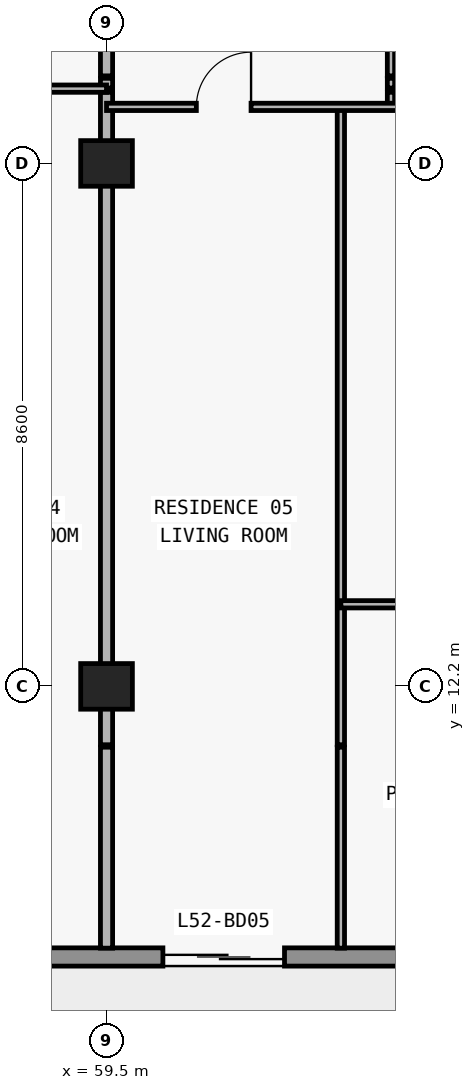
"""IFC4 building model, lengths in metres.
Left out: names, types, materials, properties, quantities, classifications, styles, units other than length and angle.
Written with IfcOpenShell. Run it as: python <this file> out.ifc"""

import sys

from ifc_helpers import new_model, si_unit, direction, frame, frame_2d, origin, origin_2d, place, context, subcontext, project, spatial, rectangle, extrude, element, fill, save


model = new_model("IFC4")
c1 = context("Model", 3, precision=1e-05, world=origin(), true_north=direction((0.0, 1.0)))
c2 = subcontext(c1, "Body", "Model", "MODEL_VIEW")
j1 = project(units=[si_unit("LENGTHUNIT", "METRE"), si_unit("PLANEANGLEUNIT", "RADIAN")], contexts=[c1])
p1 = place(None, origin())
s1 = spatial("IfcSite", under=j1, at=p1, CompositionType="ELEMENT")
p2 = place(p1, origin())
s2 = spatial("IfcBuilding", under=s1, at=p2, CompositionType="ELEMENT")
p3 = place(p2, frame((0.0, 0.0, 188.4)))
s3 = spatial("IfcBuildingStorey", under=s2, at=p3, CompositionType="ELEMENT", Elevation=188.4)
for number, where, z_axis, x_axis in (
    (1, (59.5, 12.2, 0.0), (0.0, 0.0, 1.0), (1.0, 0.0, 0.0)),
    (2, (59.5, 20.8, 0.0), (0.0, 0.0, 1.0), (1.0, 0.0, 0.0)),
):
    element("IfcColumn", number, at=place(p3, frame(where, z_axis=z_axis, x_axis=x_axis)), inside=s3, PredefinedType="COLUMN", context=c2, shape_type="SweptSolid", body=[
        extrude(rectangle(XDim=0.85, YDim=0.75, at=origin_2d()), origin(), (0.0, 0.0, 1.0), 3.05),
    ])
p4 = place(p3, frame((67.7, 7.75, 0.0), z_axis=(0.0, 0.0, 1.0), x_axis=(-1.0, 0.0, 0.0)))
e3 = element("IfcWall", 3, at=p4, inside=s3, PredefinedType="STANDARD", context=c2, shape_type="SweptSolid", body=[
    extrude(rectangle(XDim=57.6, YDim=0.3, at=frame_2d((28.8, 0.0))), origin(), (0.0, 0.0, 1.0), 3.05),
])
p5 = place(p4, frame((54.69, 0.0, 0.0)))
e4 = element("IfcOpeningElement", 4, at=p5, cuts=e3, PredefinedType="OPENING", context=c2, shape_type="SweptSolid", body=[
    extrude(rectangle(XDim=2.0, YDim=2.3, at=frame_2d((1.0, 1.15))), frame((0.0, 0.16, 0.0), z_axis=(0.0, -1.0, 0.0), x_axis=(1.0, 0.0, 0.0)), (0.0, 0.0, 1.0), 0.32),
])
p6 = place(p4, frame((50.21, 0.0, 0.65)))
e5 = element("IfcOpeningElement", 5, at=p6, cuts=e3, PredefinedType="OPENING", context=c2, shape_type="SweptSolid", body=[
    extrude(rectangle(XDim=2.6, YDim=1.85, at=frame_2d((1.3, 0.925))), frame((0.0, 0.16, 0.0), z_axis=(0.0, -1.0, 0.0), x_axis=(1.0, 0.0, 0.0)), (0.0, 0.0, 1.0), 0.32),
])
p7 = place(p4, frame((44.1, 0.0, 0.85)))
e6 = element("IfcOpeningElement", 6, at=p7, cuts=e3, PredefinedType="OPENING", context=c2, shape_type="SweptSolid", body=[
    extrude(rectangle(XDim=2.2, YDim=1.55, at=frame_2d((1.1, 0.775))), frame((0.0, 0.16, 0.0), z_axis=(0.0, -1.0, 0.0), x_axis=(1.0, 0.0, 0.0)), (0.0, 0.0, 1.0), 0.32),
])
p8 = place(p4, frame((37.69, 0.0, 0.0)))
e7 = element("IfcOpeningElement", 7, at=p8, cuts=e3, PredefinedType="OPENING", context=c2, shape_type="SweptSolid", body=[
    extrude(rectangle(XDim=2.0, YDim=2.3, at=frame_2d((1.0, 1.15))), frame((0.0, 0.16, 0.0), z_axis=(0.0, -1.0, 0.0), x_axis=(1.0, 0.0, 0.0)), (0.0, 0.0, 1.0), 0.32),
])
p9 = place(p4, frame((33.59, 0.0, 0.85)))
e8 = element("IfcOpeningElement", 8, at=p9, cuts=e3, PredefinedType="OPENING", context=c2, shape_type="SweptSolid", body=[
    extrude(rectangle(XDim=1.8, YDim=1.55, at=frame_2d((0.9, 0.775))), frame((0.0, 0.16, 0.0), z_axis=(0.0, -1.0, 0.0), x_axis=(1.0, 0.0, 0.0)), (0.0, 0.0, 1.0), 0.32),
])
p10 = place(p4, frame((29.69, 0.0, 0.0)))
e9 = element("IfcOpeningElement", 9, at=p10, cuts=e3, PredefinedType="OPENING", context=c2, shape_type="SweptSolid", body=[
    extrude(rectangle(XDim=2.0, YDim=2.3, at=frame_2d((1.0, 1.15))), frame((0.0, 0.16, 0.0), z_axis=(0.0, -1.0, 0.0), x_axis=(1.0, 0.0, 0.0)), (0.0, 0.0, 1.0), 0.32),
])
p11 = place(p4, frame((25.81, 0.0, 0.65)))
e10 = element("IfcOpeningElement", 10, at=p11, cuts=e3, PredefinedType="OPENING", context=c2, shape_type="SweptSolid", body=[
    extrude(rectangle(XDim=2.6, YDim=1.85, at=frame_2d((1.3, 0.925))), frame((0.0, 0.16, 0.0), z_axis=(0.0, -1.0, 0.0), x_axis=(1.0, 0.0, 0.0)), (0.0, 0.0, 1.0), 0.32),
])
p12 = place(p4, frame((19.7, 0.0, 0.85)))
e11 = element("IfcOpeningElement", 11, at=p12, cuts=e3, PredefinedType="OPENING", context=c2, shape_type="SweptSolid", body=[
    extrude(rectangle(XDim=2.2, YDim=1.55, at=frame_2d((1.1, 0.775))), frame((0.0, 0.16, 0.0), z_axis=(0.0, -1.0, 0.0), x_axis=(1.0, 0.0, 0.0)), (0.0, 0.0, 1.0), 0.32),
])
p13 = place(p4, frame((13.29, 0.0, 0.0)))
e12 = element("IfcOpeningElement", 12, at=p13, cuts=e3, PredefinedType="OPENING", context=c2, shape_type="SweptSolid", body=[
    extrude(rectangle(XDim=2.0, YDim=2.3, at=frame_2d((1.0, 1.15))), frame((0.0, 0.16, 0.0), z_axis=(0.0, -1.0, 0.0), x_axis=(1.0, 0.0, 0.0)), (0.0, 0.0, 1.0), 0.32),
])
p14 = place(p4, frame((9.19, 0.0, 0.85)))
e13 = element("IfcOpeningElement", 13, at=p14, cuts=e3, PredefinedType="OPENING", context=c2, shape_type="SweptSolid", body=[
    extrude(rectangle(XDim=1.8, YDim=1.55, at=frame_2d((0.9, 0.775))), frame((0.0, 0.16, 0.0), z_axis=(0.0, -1.0, 0.0), x_axis=(1.0, 0.0, 0.0)), (0.0, 0.0, 1.0), 0.32),
])
p15 = place(p4, frame((5.273, 0.0, 0.0)))
e14 = element("IfcOpeningElement", 14, at=p15, cuts=e3, PredefinedType="OPENING", context=c2, shape_type="SweptSolid", body=[
    extrude(rectangle(XDim=2.0, YDim=2.3, at=frame_2d((1.0, 1.15))), frame((0.0, 0.16, 0.0), z_axis=(0.0, -1.0, 0.0), x_axis=(1.0, 0.0, 0.0)), (0.0, 0.0, 1.0), 0.32),
])
p16 = place(p4, frame((1.073, 0.0, 0.85)))
e15 = element("IfcOpeningElement", 15, at=p16, cuts=e3, PredefinedType="OPENING", context=c2, shape_type="SweptSolid", body=[
    extrude(rectangle(XDim=2.2, YDim=1.55, at=frame_2d((1.1, 0.775))), frame((0.0, 0.16, 0.0), z_axis=(0.0, -1.0, 0.0), x_axis=(1.0, 0.0, 0.0)), (0.0, 0.0, 1.0), 0.32),
])
p17 = place(p3, frame((59.5, 7.895, 0.0), z_axis=(0.0, 0.0, 1.0), x_axis=(0.0, 1.0, 0.0)))
e16 = element("IfcWall", 16, at=p17, inside=s3, PredefinedType="PARTITIONING", context=c2, shape_type="SweptSolid", body=[
    extrude(rectangle(XDim=3.305, YDim=0.2, at=frame_2d((1.652, 0.0))), origin(), (0.0, 0.0, 1.0), 3.05),
])
p18 = place(p3, frame((59.5, 11.24, 0.0), z_axis=(0.0, 0.0, 1.0), x_axis=(0.0, 1.0, 0.0)))
e17 = element("IfcWall", 17, at=p18, inside=s3, PredefinedType="PARTITIONING", context=c2, shape_type="SweptSolid", body=[
    extrude(rectangle(XDim=10.73, YDim=0.2, at=frame_2d((5.365, 0.0))), origin(), (0.0, 0.0, 1.0), 2.263),
])
p19 = place(p3, frame((59.5, 22.04, 0.0), z_axis=(0.0, 0.0, 1.0), x_axis=(0.0, 1.0, 0.0)))
e18 = element("IfcWall", 18, at=p19, inside=s3, PredefinedType="PARTITIONING", context=c2, shape_type="SweptSolid", body=[
    extrude(rectangle(XDim=0.16, YDim=0.2, at=frame_2d((0.08, 0.0))), origin(), (0.0, 0.0, 1.0), 2.263),
])
p20 = place(p3, frame((59.5, 22.24, 0.0), z_axis=(0.0, 0.0, 1.0), x_axis=(0.0, 1.0, 0.0)))
e19 = element("IfcWall", 19, at=p20, inside=s3, PredefinedType="PARTITIONING", context=c2, shape_type="SweptSolid", body=[
    extrude(rectangle(XDim=4.36, YDim=0.2, at=frame_2d((2.18, 0.0))), origin(), (0.0, 0.0, 1.0), 2.263),
])
p21 = place(p3, frame((63.354, 7.895, 0.0), z_axis=(0.0, 0.0, 1.0), x_axis=(0.0, 1.0, 0.0)))
e20 = element("IfcWall", 20, at=p21, inside=s3, PredefinedType="PARTITIONING", context=c2, shape_type="SweptSolid", body=[
    extrude(rectangle(XDim=3.305, YDim=0.12, at=frame_2d((1.652, 0.0))), origin(), (0.0, 0.0, 1.0), 3.05),
])
p22 = place(p3, frame((63.354, 11.24, 0.0), z_axis=(0.0, 0.0, 1.0), x_axis=(0.0, 1.0, 0.0)))
e21 = element("IfcWall", 21, at=p22, inside=s3, PredefinedType="PARTITIONING", context=c2, shape_type="SweptSolid", body=[
    extrude(rectangle(XDim=10.49, YDim=0.12, at=frame_2d((5.245, 0.0))), origin(), (0.0, 0.0, 1.0), 3.05),
])
p23 = place(p3, frame((64.178, 21.73, 0.0), z_axis=(0.0, 0.0, 1.0), x_axis=(0.0, 1.0, 0.0)))
e22 = element("IfcWall", 22, at=p23, inside=s3, PredefinedType="PARTITIONING", context=c2, shape_type="SweptSolid", body=[
    extrude(rectangle(XDim=0.24, YDim=0.12, at=frame_2d((0.12, 0.0))), origin(), (0.0, 0.0, 1.0), 3.05),
])
p24 = place(p3, frame((64.178, 22.04, 0.0), z_axis=(0.0, 0.0, 1.0), x_axis=(0.0, 1.0, 0.0)))
e23 = element("IfcWall", 23, at=p24, inside=s3, PredefinedType="PARTITIONING", context=c2, shape_type="SweptSolid", body=[
    extrude(rectangle(XDim=0.16, YDim=0.12, at=frame_2d((0.08, 0.0))), origin(), (0.0, 0.0, 1.0), 3.05),
])
p25 = place(p3, frame((64.178, 22.24, 0.0), z_axis=(0.0, 0.0, 1.0), x_axis=(0.0, 1.0, 0.0)))
e24 = element("IfcWall", 24, at=p25, inside=s3, PredefinedType="PARTITIONING", context=c2, shape_type="SweptSolid", body=[
    extrude(rectangle(XDim=4.36, YDim=0.12, at=frame_2d((2.18, 0.0))), origin(), (0.0, 0.0, 1.0), 3.05),
])
p26 = place(p25, frame((1.73, 0.0, 0.0)))
e25 = element("IfcOpeningElement", 25, at=p26, cuts=e24, PredefinedType="OPENING", context=c2, shape_type="SweptSolid", body=[
    extrude(rectangle(XDim=0.9, YDim=2.15, at=frame_2d((0.45, 1.075))), frame((0.0, 0.07, 0.0), z_axis=(0.0, -1.0, 0.0), x_axis=(1.0, 0.0, 0.0)), (0.0, 0.0, 1.0), 0.14),
])
p27 = place(p3, frame((63.354, 13.55, 0.0), z_axis=(0.0, 0.0, 1.0), x_axis=(1.0, 0.0, 0.0)))
e26 = element("IfcWall", 26, at=p27, inside=s3, PredefinedType="PARTITIONING", context=c2, shape_type="SweptSolid", body=[
    extrude(rectangle(XDim=4.346, YDim=0.12, at=frame_2d((2.173, 0.0))), origin(), (0.0, 0.0, 1.0), 3.05),
])
p28 = place(p27, frame((1.723, 0.0, 0.0)))
e27 = element("IfcOpeningElement", 27, at=p28, cuts=e26, PredefinedType="OPENING", context=c2, shape_type="SweptSolid", body=[
    extrude(rectangle(XDim=0.9, YDim=2.15, at=frame_2d((0.45, 1.075))), frame((0.0, 0.07, 0.0), z_axis=(0.0, -1.0, 0.0), x_axis=(1.0, 0.0, 0.0)), (0.0, 0.0, 1.0), 0.14),
])
p29 = place(p3, frame((59.5, 21.73, 0.0), z_axis=(0.0, 0.0, 1.0), x_axis=(1.0, 0.0, 0.0)))
e28 = element("IfcWall", 28, at=p29, inside=s3, PredefinedType="PARTITIONING", context=c2, shape_type="SweptSolid", body=[
    extrude(rectangle(XDim=8.2, YDim=0.12, at=frame_2d((4.1, 0.0))), origin(), (0.0, 0.0, 1.0), 3.05),
])
p30 = place(p29, frame((1.477, 0.0, 0.0)))
e29 = element("IfcOpeningElement", 29, at=p30, cuts=e28, PredefinedType="OPENING", context=c2, shape_type="SweptSolid", body=[
    extrude(rectangle(XDim=0.9, YDim=2.15, at=frame_2d((0.45, 1.075))), frame((0.0, 0.07, 0.0), z_axis=(0.0, -1.0, 0.0), x_axis=(1.0, 0.0, 0.0)), (0.0, 0.0, 1.0), 0.14),
])
p31 = place(p29, frame((5.989, 0.0, 0.0)))
e30 = element("IfcOpeningElement", 30, at=p31, cuts=e28, PredefinedType="OPENING", context=c2, shape_type="SweptSolid", body=[
    extrude(rectangle(XDim=0.9, YDim=2.15, at=frame_2d((0.45, 1.075))), frame((0.0, 0.07, 0.0), z_axis=(0.0, -1.0, 0.0), x_axis=(1.0, 0.0, 0.0)), (0.0, 0.0, 1.0), 0.14),
])
p32 = place(p3, frame((51.32, 22.03, 0.0), z_axis=(0.0, 0.0, 1.0), x_axis=(1.0, 0.0, 0.0)))
e31 = element("IfcWall", 31, at=p32, inside=s3, PredefinedType="PARTITIONING", context=c2, shape_type="SweptSolid", body=[
    extrude(rectangle(XDim=8.18, YDim=0.12, at=frame_2d((4.09, 0.0))), origin(), (0.0, 0.0, 1.0), 3.05),
])
p33 = place(p32, frame((1.708, 0.0, 0.0)))
e32 = element("IfcOpeningElement", 32, at=p33, cuts=e31, PredefinedType="OPENING", context=c2, shape_type="SweptSolid", body=[
    extrude(rectangle(XDim=0.9, YDim=2.15, at=frame_2d((0.45, 1.075))), frame((0.0, 0.07, 0.0), z_axis=(0.0, -1.0, 0.0), x_axis=(1.0, 0.0, 0.0)), (0.0, 0.0, 1.0), 0.14),
])
p34 = place(p32, frame((5.84, 0.0, 0.0)))
e33 = element("IfcOpeningElement", 33, at=p34, cuts=e31, PredefinedType="OPENING", context=c2, shape_type="SweptSolid", body=[
    extrude(rectangle(XDim=0.9, YDim=2.15, at=frame_2d((0.45, 1.075))), frame((0.0, 0.07, 0.0), z_axis=(0.0, -1.0, 0.0), x_axis=(1.0, 0.0, 0.0)), (0.0, 0.0, 1.0), 0.14),
])
p35 = place(p15, origin())
e34 = element("IfcDoor", 34, at=p35, inside=s3, OperationType="DOUBLE_DOOR_SLIDING", PredefinedType="DOOR", context=c2, shape_type="SweptSolid", body=[
    extrude(rectangle(XDim=2.0, YDim=2.3, at=frame_2d((1.0, 1.15))), frame((0.0, 0.025, 0.0), z_axis=(0.0, -1.0, 0.0), x_axis=(1.0, 0.0, 0.0)), (0.0, 0.0, 1.0), 0.05),
])
fill(e14, e34)
p36 = place(p30, origin())
e35 = element("IfcDoor", 35, at=p36, inside=s3, OperationType="SINGLE_SWING_RIGHT", PredefinedType="DOOR", context=c2, shape_type="SweptSolid", body=[
    extrude(rectangle(XDim=0.9, YDim=2.15, at=frame_2d((0.45, 1.075))), frame((0.0, 0.025, 0.0), z_axis=(0.0, -1.0, 0.0), x_axis=(1.0, 0.0, 0.0)), (0.0, 0.0, 1.0), 0.05),
])
fill(e29, e35)
save(model, sys.argv[1])
